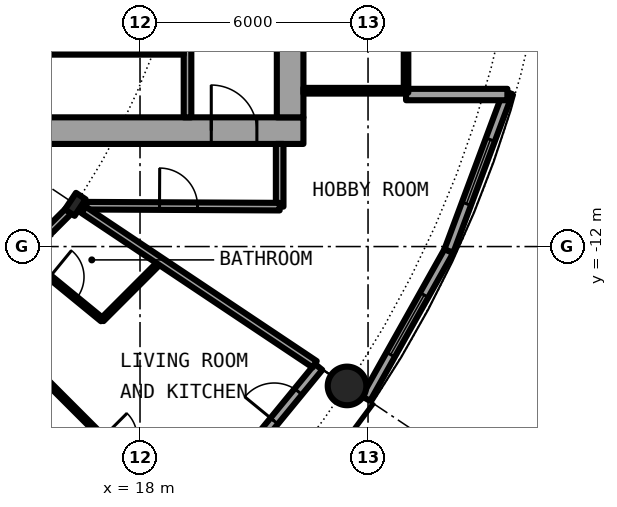
"""IFC4 building model, lengths in metres.
Left out: names, types, materials, properties, quantities, classifications, styles, units other than length and angle.
Written with IfcOpenShell. Run it as: python <this file> out.ifc"""

import sys

from ifc_helpers import new_model, si_unit, direction, frame, frame_2d, origin, origin_2d, place, context, subcontext, project, spatial, rectangle, hollow_circle, i_section, extrude, element, fill, save


model = new_model("IFC4")
c1 = context("Model", 3, precision=1e-05, world=origin(), true_north=direction((0.0, 1.0)))
c2 = subcontext(c1, "Body", "Model", "MODEL_VIEW")
j1 = project(units=[si_unit("LENGTHUNIT", "METRE"), si_unit("PLANEANGLEUNIT", "RADIAN")], contexts=[c1])
p1 = place(None, origin())
s1 = spatial("IfcSite", under=j1, at=p1, CompositionType="ELEMENT")
p2 = place(p1, origin())
s2 = spatial("IfcBuilding", under=s1, at=p2, CompositionType="ELEMENT")
p3 = place(p2, frame((0.0, 0.0, 72.75)))
s3 = spatial("IfcBuildingStorey", under=s2, at=p3, CompositionType="ELEMENT", Elevation=72.75)
p4 = place(p3, frame((23.448, -15.667, 0.0), z_axis=(0.0, 0.0, 1.0), x_axis=(1.0, 0.0, 0.0)))
e1 = element("IfcColumn", 1, at=p4, inside=s3, PredefinedType="COLUMN", context=c2, shape_type="SweptSolid", body=[
    extrude(hollow_circle(Radius=0.508, WallThickness=0.04, at=origin_2d()), origin(), (0.0, 0.0, 1.0), 3.05),
])
p5 = place(p3, frame((16.297, -10.889, 0.0), z_axis=(0.0, 0.0, 1.0), x_axis=(0.831469612303, -0.55557023302, 0.0)))
e2 = element("IfcColumn", 2, at=p5, inside=s3, PredefinedType="COLUMN", context=c2, shape_type="SweptSolid", body=[
    extrude(i_section(OverallWidth=0.306, OverallDepth=0.524, WebThickness=0.021, FlangeThickness=0.04, FilletRadius=0.027, at=origin_2d()), origin(), (0.0, 0.0, 1.0), 3.05),
])
p6 = place(p3, frame((19.304, -19.304, 0.0), z_axis=(0.0, 0.0, 1.0), x_axis=(0.634382322723, 0.773019449054, 0.0)))
e3 = element("IfcWall", 3, at=p6, inside=s3, PredefinedType="SOLIDWALL", context=c2, shape_type="SweptSolid", body=[
    extrude(rectangle(XDim=5.352, YDim=0.25, at=frame_2d((2.676, 0.0))), origin(), (0.0, 0.0, 1.0), 2.7),
])
p7 = place(p6, frame((0.441, 0.0, 0.3)))
e4 = element("IfcOpeningElement", 4, at=p7, cuts=e3, PredefinedType="OPENING", context=c2, shape_type="SweptSolid", body=[
    extrude(rectangle(XDim=1.8, YDim=2.1, at=frame_2d((0.9, 1.05))), frame((0.0, 0.135, 0.0), z_axis=(0.0, -1.0, 0.0), x_axis=(1.0, 0.0, 0.0)), (0.0, 0.0, 1.0), 0.27),
])
p8 = place(p6, frame((3.51, 0.0, 0.0)))
e5 = element("IfcOpeningElement", 5, at=p8, cuts=e3, PredefinedType="OPENING", context=c2, shape_type="SweptSolid", body=[
    extrude(rectangle(XDim=1.0, YDim=2.2, at=frame_2d((0.5, 1.1))), frame((0.0, 0.135, 0.0), z_axis=(0.0, -1.0, 0.0), x_axis=(1.0, 0.0, 0.0)), (0.0, 0.0, 1.0), 0.27),
])
p9 = place(p3, frame((23.946, -16.0, 0.0), z_axis=(0.0, 0.0, 1.0), x_axis=(0.489696356642, 0.871893042919, 0.0)))
e6 = element("IfcWall", 6, at=p9, inside=s3, PredefinedType="SOLIDWALL", context=c2, shape_type="SweptSolid", body=[
    extrude(rectangle(XDim=4.454, YDim=0.25, at=frame_2d((2.227, 0.0))), origin(), (0.0, 0.0, 1.0), 2.7),
])
p10 = place(p9, frame((1.327, 0.0, 0.3)))
e7 = element("IfcOpeningElement", 7, at=p10, cuts=e6, PredefinedType="OPENING", context=c2, shape_type="SweptSolid", body=[
    extrude(rectangle(XDim=1.8, YDim=2.1, at=frame_2d((0.9, 1.05))), frame((0.0, 0.135, 0.0), z_axis=(0.0, -1.0, 0.0), x_axis=(1.0, 0.0, 0.0)), (0.0, 0.0, 1.0), 0.27),
])
p11 = place(p3, frame((26.127, -12.117, 0.0), z_axis=(0.0, 0.0, 1.0), x_axis=(0.349247811493, 0.937030397675, 0.0)))
e8 = element("IfcWall", 8, at=p11, inside=s3, PredefinedType="SOLIDWALL", context=c2, shape_type="SweptSolid", body=[
    extrude(rectangle(XDim=4.452, YDim=0.25, at=frame_2d((2.226, 0.0))), origin(), (0.0, 0.0, 1.0), 2.7),
])
p12 = place(p11, frame((1.327, 0.0, 0.3)))
e9 = element("IfcOpeningElement", 9, at=p12, cuts=e8, PredefinedType="OPENING", context=c2, shape_type="SweptSolid", body=[
    extrude(rectangle(XDim=1.8, YDim=2.1, at=frame_2d((0.9, 1.05))), frame((0.0, 0.135, 0.0), z_axis=(0.0, -1.0, 0.0), x_axis=(1.0, 0.0, 0.0)), (0.0, 0.0, 1.0), 0.27),
])
p13 = place(p3, frame((25.0, -8.0, 0.0), z_axis=(0.0, 0.0, 1.0), x_axis=(1.0, 0.0, 0.0)))
e10 = element("IfcWall", 10, at=p13, inside=s3, PredefinedType="SOLIDWALL", context=c2, shape_type="SweptSolid", body=[
    extrude(rectangle(XDim=2.667, YDim=0.3, at=frame_2d((1.333, 0.0))), origin(), (0.0, 0.0, 1.0), 2.7),
])
p14 = place(p3, frame((8.3, -8.95, 0.0), z_axis=(0.0, 0.0, 1.0), x_axis=(1.0, 0.0, 0.0)))
e11 = element("IfcWall", 11, at=p14, inside=s3, PredefinedType="SHEAR", context=c2, shape_type="SweptSolid", body=[
    extrude(rectangle(XDim=14.0, YDim=0.7, at=frame_2d((7.0, 0.0))), origin(), (0.0, 0.0, 1.0), 3.05),
])
p15 = place(p14, frame((11.575, 0.0, 0.0)))
e12 = element("IfcOpeningElement", 12, at=p15, cuts=e11, PredefinedType="OPENING", context=c2, shape_type="SweptSolid", body=[
    extrude(rectangle(XDim=1.2, YDim=2.3, at=frame_2d((0.6, 1.15))), frame((0.0, 0.36, 0.0), z_axis=(0.0, -1.0, 0.0), x_axis=(1.0, 0.0, 0.0)), (0.0, 0.0, 1.0), 0.72),
])
p16 = place(p3, frame((21.95, 8.6, 0.0), z_axis=(0.0, 0.0, 1.0), x_axis=(0.0, -1.0, 0.0)))
e13 = element("IfcWall", 13, at=p16, inside=s3, PredefinedType="SHEAR", context=c2, shape_type="SweptSolid", body=[
    extrude(rectangle(XDim=17.2, YDim=0.7, at=frame_2d((8.6, 0.0))), origin(), (0.0, 0.0, 1.0), 3.05),
])
p17 = place(p16, frame((7.7, 0.0, 0.0)))
e14 = element("IfcOpeningElement", 14, at=p17, cuts=e13, PredefinedType="OPENING", context=c2, shape_type="SweptSolid", body=[
    extrude(rectangle(XDim=1.8, YDim=2.3, at=frame_2d((0.9, 1.15))), frame((0.0, 0.36, 0.0), z_axis=(0.0, -1.0, 0.0), x_axis=(1.0, 0.0, 0.0)), (0.0, 0.0, 1.0), 0.72),
])
p18 = place(p3, frame((19.25, -8.6, 0.0), z_axis=(0.0, 0.0, 1.0), x_axis=(0.0, 1.0, 0.0)))
e15 = element("IfcWall", 15, at=p18, inside=s3, PredefinedType="SOLIDWALL", context=c2, shape_type="SweptSolid", body=[
    extrude(rectangle(XDim=7.025, YDim=0.2, at=frame_2d((3.513, 0.0))), origin(), (0.0, 0.0, 1.0), 2.7),
])
p19 = place(p18, frame((2.35, 0.0, 0.0)))
e16 = element("IfcOpeningElement", 16, at=p19, cuts=e15, PredefinedType="OPENING", context=c2, shape_type="SweptSolid", body=[
    extrude(rectangle(XDim=1.1, YDim=2.3, at=frame_2d((0.55, 1.15))), frame((0.0, 0.11, 0.0), z_axis=(0.0, -1.0, 0.0), x_axis=(1.0, 0.0, 0.0)), (0.0, 0.0, 1.0), 0.22),
])
p20 = place(p3, frame((15.45, -6.875, 0.0), z_axis=(0.0, 0.0, 1.0), x_axis=(1.0, 0.0, 0.0)))
e17 = element("IfcWall", 17, at=p20, inside=s3, PredefinedType="PARTITIONING", context=c2, shape_type="SweptSolid", body=[
    extrude(rectangle(XDim=3.7, YDim=0.15, at=frame_2d((1.85, 0.0))), origin(), (0.0, 0.0, 1.0), 2.7),
])
p21 = place(p20, frame((1.4, 0.0, 0.0)))
e18 = element("IfcOpeningElement", 18, at=p21, cuts=e17, PredefinedType="OPENING", context=c2, shape_type="SweptSolid", body=[
    extrude(rectangle(XDim=0.9, YDim=2.3, at=frame_2d((0.45, 1.15))), frame((0.0, 0.085, 0.0), z_axis=(0.0, -1.0, 0.0), x_axis=(1.0, 0.0, 0.0)), (0.0, 0.0, 1.0), 0.17),
])
p22 = place(p3, frame((22.3, -7.9, 0.0), z_axis=(0.0, 0.0, 1.0), x_axis=(1.0, 0.0, 0.0)))
e19 = element("IfcWall", 19, at=p22, inside=s3, PredefinedType="PARTITIONING", context=c2, shape_type="SweptSolid", body=[
    extrude(rectangle(XDim=2.64, YDim=0.15, at=frame_2d((1.32, 0.0))), origin(), (0.0, 0.0, 1.0), 2.7),
])
p23 = place(p3, frame((25.0, -7.95, 0.0), z_axis=(0.0, 0.0, 1.0), x_axis=(0.0, 1.0, 0.0)))
e20 = element("IfcWall", 20, at=p23, inside=s3, PredefinedType="PARTITIONING", context=c2, shape_type="SweptSolid", body=[
    extrude(rectangle(XDim=15.9, YDim=0.12, at=frame_2d((7.95, 0.0))), origin(), (0.0, 0.0, 1.0), 2.7),
])
p24 = place(p23, frame((0.95, 0.0, 0.1)))
e21 = element("IfcOpeningElement", 21, at=p24, cuts=e20, PredefinedType="OPENING", context=c2, shape_type="SweptSolid", body=[
    extrude(rectangle(XDim=14.0, YDim=2.35, at=frame_2d((7.0, 1.175))), frame((0.0, 0.07, 0.0), z_axis=(0.0, -1.0, 0.0), x_axis=(1.0, 0.0, 0.0)), (0.0, 0.0, 1.0), 0.14),
])
p25 = place(p3, frame((17.004, -13.927, 0.0), z_axis=(0.0, 0.0, 1.0), x_axis=(0.707106781187, 0.707106781187, 0.0)))
e22 = element("IfcWall", 22, at=p25, inside=s3, PredefinedType="PARTITIONING", context=c2, shape_type="SweptSolid", body=[
    extrude(rectangle(XDim=2.175, YDim=0.1, at=frame_2d((1.088, 0.0))), origin(), (0.0, 0.0, 1.0), 2.7),
])
p26 = place(p3, frame((21.675, -10.95, 0.0), z_axis=(0.0, 0.0, 1.0), x_axis=(0.0, 1.0, 0.0)))
e23 = element("IfcWall", 23, at=p26, inside=s3, PredefinedType="PARTITIONING", context=c2, shape_type="SweptSolid", body=[
    extrude(rectangle(XDim=1.65, YDim=0.2, at=frame_2d((0.825, 0.0))), origin(), (0.0, 0.0, 1.0), 2.7),
])
p27 = place(p3, frame((11.0, -16.186, 0.0), z_axis=(0.0, 0.0, 1.0), x_axis=(0.707106781187, 0.707106781187, 0.0)))
e24 = element("IfcWall", 24, at=p27, inside=s3, PredefinedType="PARTITIONING", context=c2, shape_type="SweptSolid", body=[
    extrude(rectangle(XDim=7.334, YDim=0.2, at=frame_2d((3.667, 0.0))), origin(), (0.0, 0.0, 1.0), 2.38),
])
p28 = place(p27, frame((2.211, 0.0, 0.0)))
e25 = element("IfcOpeningElement", 25, at=p28, cuts=e24, PredefinedType="OPENING", context=c2, shape_type="SweptSolid", body=[
    extrude(rectangle(XDim=1.0, YDim=2.3, at=frame_2d((0.5, 1.15))), frame((0.0, 0.11, 0.0), z_axis=(0.0, -1.0, 0.0), x_axis=(1.0, 0.0, 0.0)), (0.0, 0.0, 1.0), 0.22),
])
p29 = place(p3, frame((16.588, -10.925, 0.0), z_axis=(0.0, 0.0, 1.0), x_axis=(0.999988019025, -0.004895079807, 0.0)))
e26 = element("IfcWall", 26, at=p29, inside=s3, PredefinedType="PARTITIONING", context=c2, shape_type="SweptSolid", body=[
    extrude(rectangle(XDim=5.087, YDim=0.2, at=frame_2d((2.543, 0.0))), origin(), (0.0, 0.0, 1.0), 2.7),
])
p30 = place(p29, frame((1.925, 0.0, 0.0)))
e27 = element("IfcOpeningElement", 27, at=p30, cuts=e26, PredefinedType="OPENING", context=c2, shape_type="SweptSolid", body=[
    extrude(rectangle(XDim=1.0, YDim=2.3, at=frame_2d((0.5, 1.15))), frame((0.0, 0.11, 0.0), z_axis=(0.0, -1.0, 0.0), x_axis=(1.0, 0.0, 0.0)), (0.0, 0.0, 1.0), 0.22),
])
p31 = place(p3, frame((14.945, -12.241, 0.0), z_axis=(0.0, 0.0, 1.0), x_axis=(0.77367517848, -0.633582447834, 0.0)))
e28 = element("IfcWall", 28, at=p31, inside=s3, PredefinedType="PARTITIONING", context=c2, shape_type="SweptSolid", body=[
    extrude(rectangle(XDim=2.661, YDim=0.1, at=frame_2d((1.331, 0.0))), origin(), (0.0, 0.0, 1.0), 2.7),
])
p32 = place(p31, frame((0.881, 0.0, 0.0)))
e29 = element("IfcOpeningElement", 29, at=p32, cuts=e28, PredefinedType="OPENING", context=c2, shape_type="SweptSolid", body=[
    extrude(rectangle(XDim=0.9, YDim=2.3, at=frame_2d((0.45, 1.15))), frame((0.0, 0.06, 0.0), z_axis=(0.0, -1.0, 0.0), x_axis=(1.0, 0.0, 0.0)), (0.0, 0.0, 1.0), 0.12),
])
p33 = place(p3, frame((15.465, -15.465, 0.0), z_axis=(0.0, 0.0, 1.0), x_axis=(0.707106781187, -0.707106781187, 0.0)))
e30 = element("IfcWall", 30, at=p33, inside=s3, PredefinedType="PARTITIONING", context=c2, shape_type="SweptSolid", body=[
    extrude(rectangle(XDim=5.305, YDim=0.1, at=frame_2d((2.652, 0.0))), origin(), (0.0, 0.0, 1.0), 2.7),
])
p34 = place(p33, frame((2.202, 0.0, 0.0)))
e31 = element("IfcOpeningElement", 31, at=p34, cuts=e30, PredefinedType="OPENING", context=c2, shape_type="SweptSolid", body=[
    extrude(rectangle(XDim=0.9, YDim=2.3, at=frame_2d((0.45, 1.15))), frame((0.0, 0.06, 0.0), z_axis=(0.0, -1.0, 0.0), x_axis=(1.0, 0.0, 0.0)), (0.0, 0.0, 1.0), 0.12),
])
p35 = place(p3, frame((16.515, -11.035, 0.0), z_axis=(0.0, 0.0, 1.0), x_axis=(0.831505405283, -0.555516661303, 0.0)))
e32 = element("IfcWall", 32, at=p35, inside=s3, PredefinedType="PARTITIONING", context=c2, shape_type="SweptSolid", body=[
    extrude(rectangle(XDim=7.312, YDim=0.2, at=frame_2d((3.656, 0.0))), origin(), (0.0, 0.0, 1.0), 2.7),
])
p36 = place(p8, origin())
e33 = element("IfcDoor", 33, at=p36, inside=s3, OperationType="SINGLE_SWING_LEFT", PredefinedType="DOOR", context=c2, shape_type="SweptSolid", body=[
    extrude(rectangle(XDim=1.0, YDim=2.2, at=frame_2d((0.5, 1.1))), frame((0.0, 0.025, 0.0), z_axis=(0.0, -1.0, 0.0), x_axis=(1.0, 0.0, 0.0)), (0.0, 0.0, 1.0), 0.05),
])
fill(e5, e33)
p37 = place(p10, origin())
e34 = element("IfcWindow", 34, at=p37, inside=s3, PartitioningType="SINGLE_PANEL", PredefinedType="WINDOW", context=c2, shape_type="SweptSolid", body=[
    extrude(rectangle(XDim=1.8, YDim=2.1, at=frame_2d((0.9, 1.05))), frame((0.0, 0.03, 0.0), z_axis=(0.0, -1.0, 0.0), x_axis=(1.0, 0.0, 0.0)), (0.0, 0.0, 1.0), 0.06),
])
fill(e7, e34)
p38 = place(p12, origin())
e35 = element("IfcWindow", 35, at=p38, inside=s3, PartitioningType="SINGLE_PANEL", PredefinedType="WINDOW", context=c2, shape_type="SweptSolid", body=[
    extrude(rectangle(XDim=1.8, YDim=2.1, at=frame_2d((0.9, 1.05))), frame((0.0, 0.03, 0.0), z_axis=(0.0, -1.0, 0.0), x_axis=(1.0, 0.0, 0.0)), (0.0, 0.0, 1.0), 0.06),
])
fill(e9, e35)
p39 = place(p21, origin())
e36 = element("IfcDoor", 36, at=p39, inside=s3, OperationType="SINGLE_SWING_LEFT", PredefinedType="DOOR", context=c2, shape_type="SweptSolid", body=[
    extrude(rectangle(XDim=0.9, YDim=2.3, at=frame_2d((0.45, 1.15))), frame((0.0, 0.025, 0.0), z_axis=(0.0, -1.0, 0.0), x_axis=(1.0, 0.0, 0.0)), (0.0, 0.0, 1.0), 0.05),
])
fill(e18, e36)
p40 = place(p15, origin())
e37 = element("IfcDoor", 37, at=p40, inside=s3, OperationType="SINGLE_SWING_LEFT", PredefinedType="DOOR", context=c2, shape_type="SweptSolid", body=[
    extrude(rectangle(XDim=1.2, YDim=2.3, at=frame_2d((0.6, 1.15))), frame((0.0, 0.025, 0.0), z_axis=(0.0, -1.0, 0.0), x_axis=(1.0, 0.0, 0.0)), (0.0, 0.0, 1.0), 0.05),
])
fill(e12, e37)
p41 = place(p24, origin())
e38 = element("IfcWindow", 38, at=p41, inside=s3, PartitioningType="SINGLE_PANEL", PredefinedType="WINDOW", context=c2, shape_type="SweptSolid", body=[
    extrude(rectangle(XDim=14.0, YDim=2.35, at=frame_2d((7.0, 1.175))), frame((0.0, 0.03, 0.0), z_axis=(0.0, -1.0, 0.0), x_axis=(1.0, 0.0, 0.0)), (0.0, 0.0, 1.0), 0.06),
])
fill(e21, e38)
p42 = place(p32, origin())
e39 = element("IfcDoor", 39, at=p42, inside=s3, OperationType="SINGLE_SWING_LEFT", PredefinedType="DOOR", context=c2, shape_type="SweptSolid", body=[
    extrude(rectangle(XDim=0.9, YDim=2.3, at=frame_2d((0.45, 1.15))), frame((0.0, 0.025, 0.0), z_axis=(0.0, -1.0, 0.0), x_axis=(1.0, 0.0, 0.0)), (0.0, 0.0, 1.0), 0.05),
])
fill(e29, e39)
p43 = place(p30, origin())
e40 = element("IfcDoor", 40, at=p43, inside=s3, OperationType="SINGLE_SWING_LEFT", PredefinedType="DOOR", context=c2, shape_type="SweptSolid", body=[
    extrude(rectangle(XDim=1.0, YDim=2.3, at=frame_2d((0.5, 1.15))), frame((0.0, 0.025, 0.0), z_axis=(0.0, -1.0, 0.0), x_axis=(1.0, 0.0, 0.0)), (0.0, 0.0, 1.0), 0.05),
])
fill(e27, e40)
save(model, sys.argv[1])
